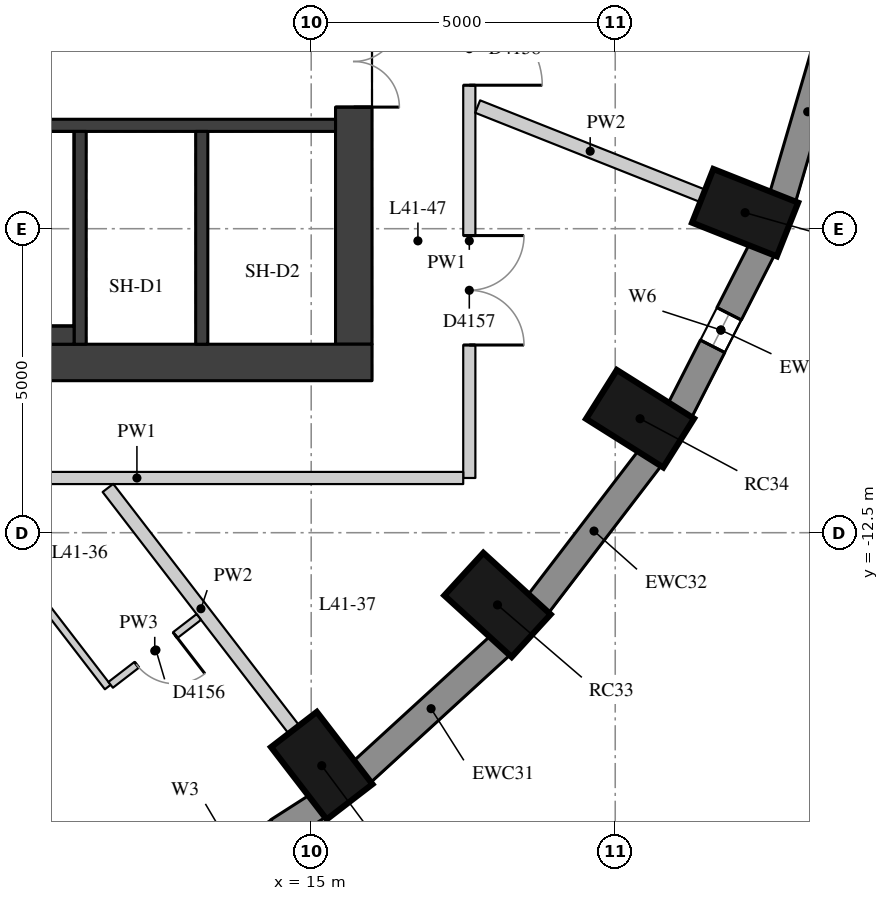
"""IFC4 building model, lengths in metres.
Left out: names, types, materials, properties, quantities, classifications, styles, units other than length and angle.
Written with IfcOpenShell. Run it as: python <this file> out.ifc"""

import sys

from ifc_helpers import new_model, si_unit, direction, frame, frame_2d, origin, origin_2d, place, context, subcontext, project, spatial, rectangle, extrude, element, fill, save


model = new_model("IFC4")
c1 = context("Model", 3, precision=1e-05, world=origin(), true_north=direction((0.0, 1.0)))
c2 = subcontext(c1, "Body", "Model", "MODEL_VIEW")
j1 = project(units=[si_unit("LENGTHUNIT", "METRE"), si_unit("PLANEANGLEUNIT", "RADIAN")], contexts=[c1])
p1 = place(None, origin())
s1 = spatial("IfcSite", under=j1, at=p1, CompositionType="ELEMENT")
p2 = place(p1, origin())
s2 = spatial("IfcBuilding", under=s1, at=p2, CompositionType="ELEMENT")
p3 = place(p2, frame((0.0, 0.0, 148.4)))
s3 = spatial("IfcBuildingStorey", under=s2, at=p3, CompositionType="ELEMENT", Elevation=148.4)
for number, where, z_axis, x_axis in (
    (1, (15.173, -16.332, 0.0), (0.0, 0.0, 1.0), (0.61, -0.792, 0.0)),
    (2, (18.064, -13.688, 0.0), (0.0, 0.0, 1.0), (0.738, -0.675, 0.0)),
    (3, (20.408, -10.625, 0.0), (0.0, 0.0, 1.0), (0.846, -0.533, 0.0)),
    (4, (22.136, -7.236, 0.0), (0.0, 0.0, 1.0), (0.93, -0.369, 0.0)),
):
    element("IfcColumn", number, at=place(p3, frame(where, z_axis=z_axis, x_axis=x_axis)), inside=s3, PredefinedType="COLUMN", context=c2, shape_type="SweptSolid", body=[
        extrude(rectangle(XDim=1.5, YDim=0.95, at=origin_2d()), origin(), (0.0, 0.0, 1.0), 3.3),
    ])
p4 = place(p3, frame((12.455, -18.693, 0.0), z_axis=(0.0, 0.0, 1.0), x_axis=(0.842065914439, 0.539374633943, 0.0)))
e5 = element("IfcWall", 5, at=p4, inside=s3, PredefinedType="SOLIDWALL", context=c2, shape_type="SweptSolid", body=[
    extrude(rectangle(XDim=3.151, YDim=0.45, at=frame_2d((1.576, 0.0))), origin(), (0.0, 0.0, 1.0), 3.02),
])
p5 = place(p4, frame((0.776, 0.0, 0.4)))
e6 = element("IfcOpeningElement", 6, at=p5, cuts=e5, PredefinedType="OPENING", context=c2, shape_type="SweptSolid", body=[
    extrude(rectangle(XDim=1.6, YDim=1.75, at=frame_2d((0.8, 0.875))), frame((0.0, 0.235, 0.0), z_axis=(0.0, -1.0, 0.0), x_axis=(1.0, 0.0, 0.0)), (0.0, 0.0, 1.0), 0.47),
])
p6 = place(p3, frame((15.83, -16.439, 0.0), z_axis=(0.0, 0.0, 1.0), x_axis=(0.737808755941, 0.675009807082, 0.0)))
e7 = element("IfcWall", 7, at=p6, inside=s3, PredefinedType="SOLIDWALL", context=c2, shape_type="SweptSolid", body=[
    extrude(rectangle(XDim=3.094, YDim=0.45, at=frame_2d((1.547, 0.0))), origin(), (0.0, 0.0, 1.0), 3.02),
])
p7 = place(p3, frame((18.728, -13.679, 0.0), z_axis=(0.0, 0.0, 1.0), x_axis=(0.607817056371, 0.794077090706, 0.0)))
e8 = element("IfcWall", 8, at=p7, inside=s3, PredefinedType="SOLIDWALL", context=c2, shape_type="SweptSolid", body=[
    extrude(rectangle(XDim=3.037, YDim=0.45, at=frame_2d((1.519, 0.0))), origin(), (0.0, 0.0, 1.0), 3.02),
])
p8 = place(p3, frame((21.059, -10.497, 0.0), z_axis=(0.0, 0.0, 1.0), x_axis=(0.454133999889, 0.890933392653, 0.0)))
e9 = element("IfcWall", 9, at=p8, inside=s3, PredefinedType="SOLIDWALL", context=c2, shape_type="SweptSolid", body=[
    extrude(rectangle(XDim=2.986, YDim=0.45, at=frame_2d((1.493, 0.0))), origin(), (0.0, 0.0, 1.0), 3.02),
])
p9 = place(p8, frame((1.193, 0.0, 0.4)))
e10 = element("IfcOpeningElement", 10, at=p9, cuts=e9, PredefinedType="OPENING", context=c2, shape_type="SweptSolid", body=[
    extrude(rectangle(XDim=0.6, YDim=1.75, at=frame_2d((0.3, 0.875))), frame((0.0, 0.235, 0.0), z_axis=(0.0, -1.0, 0.0), x_axis=(1.0, 0.0, 0.0)), (0.0, 0.0, 1.0), 0.47),
])
p10 = place(p3, frame((22.751, -6.991, 0.0), z_axis=(0.0, 0.0, 1.0), x_axis=(0.281049481624, 0.959693278542, 0.0)))
e11 = element("IfcWall", 11, at=p10, inside=s3, PredefinedType="SOLIDWALL", context=c2, shape_type="SweptSolid", body=[
    extrude(rectangle(XDim=2.948, YDim=0.45, at=frame_2d((1.474, 0.0))), origin(), (0.0, 0.0, 1.0), 3.02),
])
p11 = place(p3, frame((15.7, -9.4, 0.0), z_axis=(0.0, 0.0, 1.0), x_axis=(0.0, 1.0, 0.0)))
e12 = element("IfcWall", 12, at=p11, inside=s3, PredefinedType="SHEAR", context=c2, shape_type="SweptSolid", body=[
    extrude(rectangle(XDim=18.8, YDim=0.6, at=frame_2d((9.4, 0.0))), origin(), (0.0, 0.0, 1.0), 3.02),
])
p12 = place(p11, frame((13.4, 0.0, 0.0)))
e13 = element("IfcOpeningElement", 13, at=p12, cuts=e12, PredefinedType="OPENING", context=c2, shape_type="SweptSolid", body=[
    extrude(rectangle(XDim=1.5, YDim=2.1, at=frame_2d((0.75, 1.05))), frame((0.0, 0.31, 0.0), z_axis=(0.0, -1.0, 0.0), x_axis=(1.0, 0.0, 0.0)), (0.0, 0.0, 1.0), 0.62),
])
p13 = place(p11, frame((3.9, 0.0, 0.0)))
e14 = element("IfcOpeningElement", 14, at=p13, cuts=e12, PredefinedType="OPENING", context=c2, shape_type="SweptSolid", body=[
    extrude(rectangle(XDim=1.5, YDim=2.1, at=frame_2d((0.75, 1.05))), frame((0.0, 0.31, 0.0), z_axis=(0.0, -1.0, 0.0), x_axis=(1.0, 0.0, 0.0)), (0.0, 0.0, 1.0), 0.62),
])
p14 = place(p3, frame((4.0, -9.7, 0.0), z_axis=(0.0, 0.0, 1.0), x_axis=(1.0, 0.0, 0.0)))
e15 = element("IfcWall", 15, at=p14, inside=s3, PredefinedType="SHEAR", context=c2, shape_type="SweptSolid", body=[
    extrude(rectangle(XDim=12.0, YDim=0.6, at=frame_2d((6.0, 0.0))), origin(), (0.0, 0.0, 1.0), 3.02),
])
p15 = place(p3, frame((4.6, -5.8, 0.0), z_axis=(0.0, 0.0, 1.0), x_axis=(1.0, 0.0, 0.0)))
e16 = element("IfcWall", 16, at=p15, inside=s3, PredefinedType="SHEAR", context=c2, shape_type="SweptSolid", body=[
    extrude(rectangle(XDim=10.8, YDim=0.2, at=frame_2d((5.4, 0.0))), origin(), (0.0, 0.0, 1.0), 3.02),
])
for number, where, z_axis, x_axis in (
    (17, (11.2, -9.4, 0.0), (0.0, 0.0, 1.0), (0.0, 1.0, 0.0)),
    (18, (13.2, -9.4, 0.0), (0.0, 0.0, 1.0), (0.0, 1.0, 0.0)),
):
    element("IfcWall", number, at=place(p3, frame(where, z_axis=z_axis, x_axis=x_axis)), inside=s3, PredefinedType="SHEAR", context=c2, shape_type="SweptSolid", body=[
        extrude(rectangle(XDim=3.5, YDim=0.2, at=frame_2d((1.75, 0.0))), origin(), (0.0, 0.0, 1.0), 3.02),
    ])
p16 = place(p3, frame((6.22, -9.25, 0.0), z_axis=(0.0, 0.0, 1.0), x_axis=(1.0, 0.0, 0.0)))
e19 = element("IfcWall", 19, at=p16, inside=s3, PredefinedType="PARTITIONING", context=c2, shape_type="SweptSolid", body=[
    extrude(rectangle(XDim=4.88, YDim=0.3, at=frame_2d((2.44, 0.0))), origin(), (0.0, 0.0, 1.0), 3.02),
])
p17 = place(p3, frame((17.6, -3.8, 0.0), z_axis=(0.0, 0.0, 1.0), x_axis=(0.0, -1.0, 0.0)))
e20 = element("IfcWall", 20, at=p17, inside=s3, PredefinedType="PARTITIONING", context=c2, shape_type="SweptSolid", body=[
    extrude(rectangle(XDim=7.8, YDim=0.2, at=frame_2d((3.9, 0.0))), origin(), (0.0, 0.0, 1.0), 3.02),
])
p18 = place(p17, frame((3.813, 0.0, 0.0)))
e21 = element("IfcOpeningElement", 21, at=p18, cuts=e20, PredefinedType="OPENING", context=c2, shape_type="SweptSolid", body=[
    extrude(rectangle(XDim=1.8, YDim=2.1, at=frame_2d((0.9, 1.05))), frame((0.0, 0.11, 0.0), z_axis=(0.0, -1.0, 0.0), x_axis=(1.0, 0.0, 0.0)), (0.0, 0.0, 1.0), 0.22),
])
p19 = place(p17, frame((0.14, 0.0, 0.0)))
e22 = element("IfcOpeningElement", 22, at=p19, cuts=e20, PredefinedType="OPENING", context=c2, shape_type="SweptSolid", body=[
    extrude(rectangle(XDim=1.2, YDim=2.1, at=frame_2d((0.6, 1.05))), frame((0.0, 0.11, 0.0), z_axis=(0.0, -1.0, 0.0), x_axis=(1.0, 0.0, 0.0)), (0.0, 0.0, 1.0), 0.22),
])
p20 = place(p3, frame((17.5, -11.6, 0.0), z_axis=(0.0, 0.0, 1.0), x_axis=(-1.0, 0.0, 0.0)))
e23 = element("IfcWall", 23, at=p20, inside=s3, PredefinedType="PARTITIONING", context=c2, shape_type="SweptSolid", body=[
    extrude(rectangle(XDim=10.732, YDim=0.2, at=frame_2d((5.366, 0.0))), origin(), (0.0, 0.0, 1.0), 3.02),
])
p21 = place(p3, frame((14.716, -15.737, 0.0), z_axis=(0.0, 0.0, 1.0), x_axis=(-0.609986007715, 0.792412184657, 0.0)))
e24 = element("IfcWall", 24, at=p21, inside=s3, PredefinedType="PARTITIONING", context=c2, shape_type="SweptSolid", body=[
    extrude(rectangle(XDim=5.015, YDim=0.22, at=frame_2d((2.507, 0.0))), origin(), (0.0, 0.0, 1.0), 3.02),
])
p22 = place(p3, frame((21.439, -6.96, 0.0), z_axis=(0.0, 0.0, 1.0), x_axis=(-0.929517399972, 0.368778257426, 0.0)))
e25 = element("IfcWall", 25, at=p22, inside=s3, PredefinedType="PARTITIONING", context=c2, shape_type="SweptSolid", body=[
    extrude(rectangle(XDim=3.982, YDim=0.22, at=frame_2d((1.991, 0.0))), origin(), (0.0, 0.0, 1.0), 3.02),
])
p23 = place(p3, frame((9.109, -11.732, 0.0), z_axis=(0.0, 0.0, 1.0), x_axis=(0.609996270026, -0.79240428479, 0.0)))
e26 = element("IfcWall", 26, at=p23, inside=s3, PredefinedType="PARTITIONING", context=c2, shape_type="SweptSolid", body=[
    extrude(rectangle(XDim=4.173, YDim=0.12, at=frame_2d((2.087, 0.0))), origin(), (0.0, 0.0, 1.0), 3.02),
])
p24 = place(p3, frame((11.702, -15.002, 0.0), z_axis=(0.0, 0.0, 1.0), x_axis=(0.792395776304, 0.610007322657, 0.0)))
e27 = element("IfcWall", 27, at=p24, inside=s3, PredefinedType="PARTITIONING", context=c2, shape_type="SweptSolid", body=[
    extrude(rectangle(XDim=1.83, YDim=0.12, at=frame_2d((0.915, 0.0))), origin(), (0.0, 0.0, 1.0), 3.02),
])
p25 = place(p24, frame((0.54, 0.0, 0.0)))
e28 = element("IfcOpeningElement", 28, at=p25, cuts=e27, PredefinedType="OPENING", context=c2, shape_type="SweptSolid", body=[
    extrude(rectangle(XDim=0.8, YDim=2.1, at=frame_2d((0.4, 1.05))), frame((0.0, 0.07, 0.0), z_axis=(0.0, -1.0, 0.0), x_axis=(1.0, 0.0, 0.0)), (0.0, 0.0, 1.0), 0.14),
])
p26 = place(p9, origin())
e29 = element("IfcWindow", 29, at=p26, inside=s3, PartitioningType="SINGLE_PANEL", PredefinedType="WINDOW", context=c2, shape_type="SweptSolid", body=[
    extrude(rectangle(XDim=0.6, YDim=1.75, at=frame_2d((0.3, 0.875))), frame((0.0, 0.035, 0.0), z_axis=(0.0, -1.0, 0.0), x_axis=(1.0, 0.0, 0.0)), (0.0, 0.0, 1.0), 0.06),
])
fill(e10, e29)
p27 = place(p13, origin())
e30 = element("IfcDoor", 30, at=p27, inside=s3, OperationType="DOUBLE_DOOR_SINGLE_SWING", PredefinedType="DOOR", context=c2, shape_type="SweptSolid", body=[
    extrude(rectangle(XDim=1.5, YDim=2.1, at=frame_2d((0.75, 1.05))), frame((0.0, 0.025, 0.0), z_axis=(0.0, -1.0, 0.0), x_axis=(1.0, 0.0, 0.0)), (0.0, 0.0, 1.0), 0.05),
])
fill(e14, e30)
p28 = place(p25, origin())
e31 = element("IfcDoor", 31, at=p28, inside=s3, OperationType="SINGLE_SWING_LEFT", PredefinedType="DOOR", context=c2, shape_type="SweptSolid", body=[
    extrude(rectangle(XDim=0.8, YDim=2.1, at=frame_2d((0.4, 1.05))), frame((0.0, 0.025, 0.0), z_axis=(0.0, -1.0, 0.0), x_axis=(1.0, 0.0, 0.0)), (0.0, 0.0, 1.0), 0.05),
])
fill(e28, e31)
p29 = place(p18, origin())
e32 = element("IfcDoor", 32, at=p29, inside=s3, OperationType="DOUBLE_DOOR_SINGLE_SWING", PredefinedType="DOOR", context=c2, shape_type="SweptSolid", body=[
    extrude(rectangle(XDim=1.8, YDim=2.1, at=frame_2d((0.9, 1.05))), frame((0.0, 0.025, 0.0), z_axis=(0.0, -1.0, 0.0), x_axis=(1.0, 0.0, 0.0)), (0.0, 0.0, 1.0), 0.05),
])
fill(e21, e32)
p30 = place(p19, origin())
e33 = element("IfcDoor", 33, at=p30, inside=s3, OperationType="SINGLE_SWING_RIGHT", PredefinedType="DOOR", context=c2, shape_type="SweptSolid", body=[
    extrude(rectangle(XDim=1.2, YDim=2.1, at=frame_2d((0.6, 1.05))), frame((0.0, 0.025, 0.0), z_axis=(0.0, -1.0, 0.0), x_axis=(1.0, 0.0, 0.0)), (0.0, 0.0, 1.0), 0.05),
])
fill(e22, e33)
save(model, sys.argv[1])
